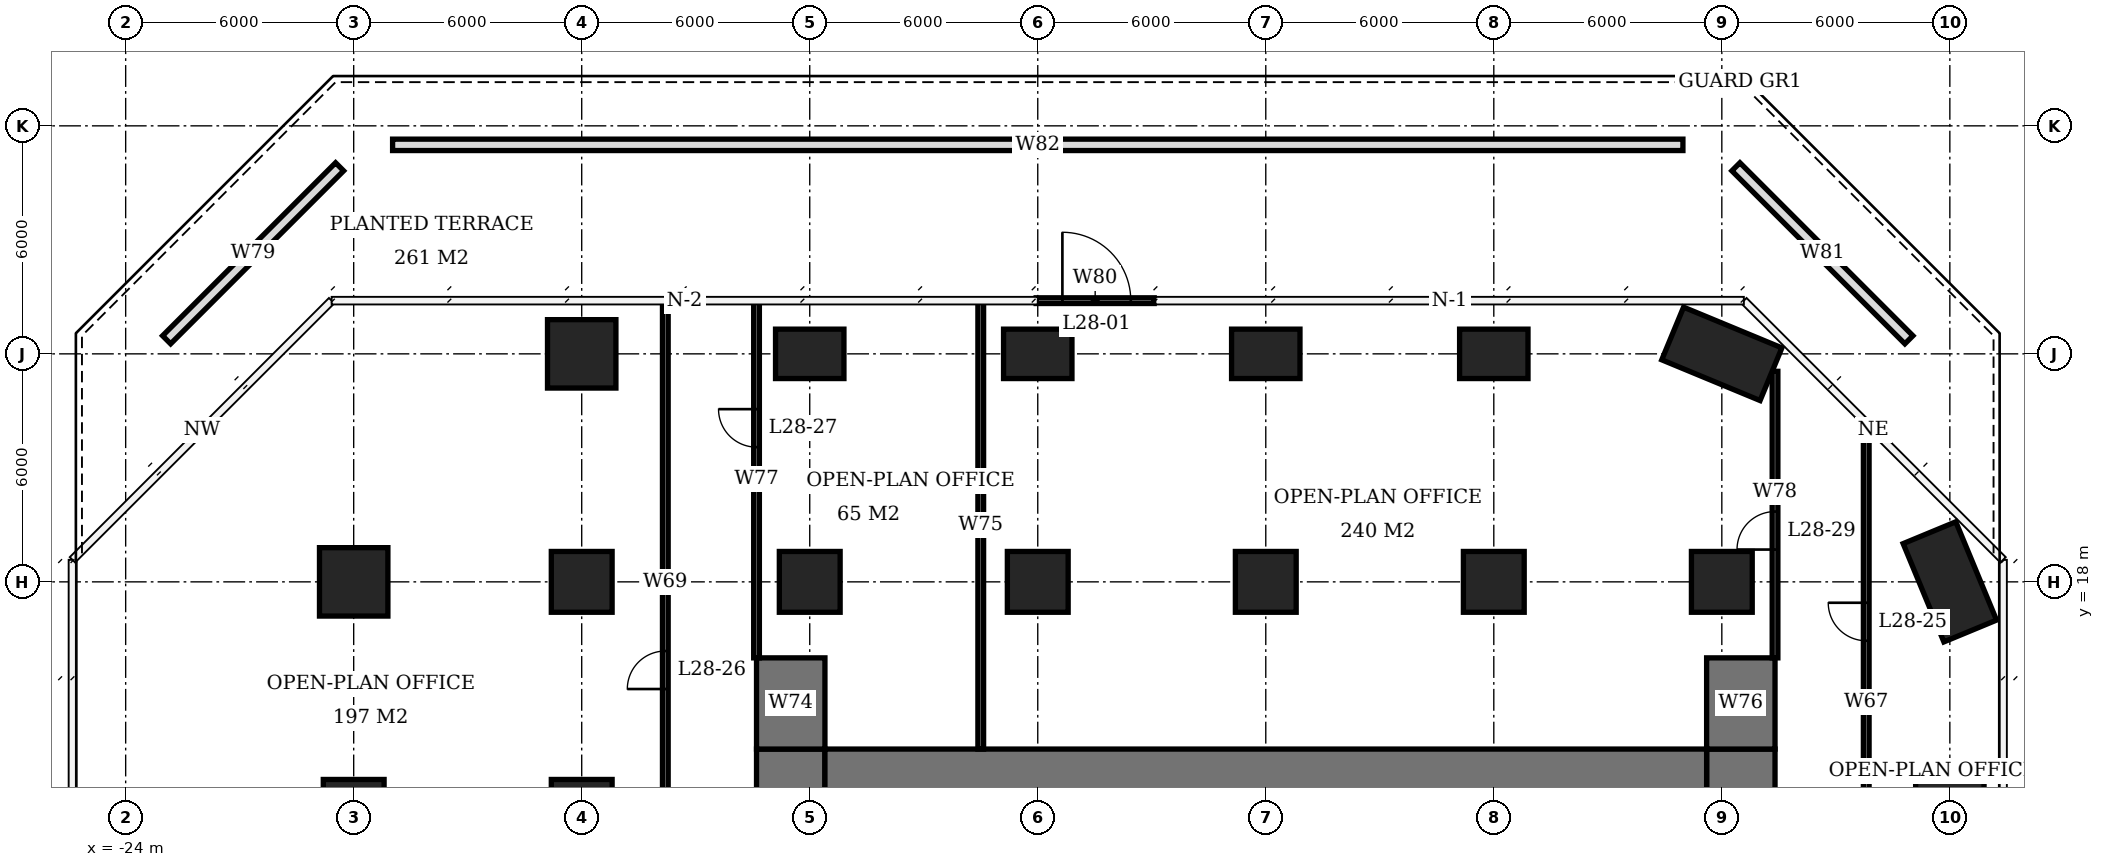
"""IFC4 building model, lengths in metres.
Left out: names, types, materials, properties, quantities, classifications, styles, units other than length and angle.
Written with IfcOpenShell. Run it as: python <this file> out.ifc"""

import sys

from ifc_helpers import new_model, si_unit, direction, frame, frame_2d, origin, origin_2d, place, context, subcontext, project, spatial, rectangle, extrude, element, fill, save


model = new_model("IFC4")
c1 = context("Model", 3, precision=1e-05, world=origin(), true_north=direction((0.0, 1.0)))
c2 = subcontext(c1, "Body", "Model", "MODEL_VIEW")
j1 = project(units=[si_unit("LENGTHUNIT", "METRE"), si_unit("PLANEANGLEUNIT", "RADIAN")], contexts=[c1])
p1 = place(None, origin())
s1 = spatial("IfcSite", under=j1, at=p1, CompositionType="ELEMENT")
p2 = place(p1, origin())
s2 = spatial("IfcBuilding", under=s1, at=p2, CompositionType="ELEMENT")
p3 = place(p2, frame((0.0, 0.0, 117.2)))
s3 = spatial("IfcBuildingStorey", under=s2, at=p3, CompositionType="ELEMENT", Elevation=117.2)
p4 = place(p3, frame((-18.0, 12.0, 0.0), z_axis=(0.0, 0.0, 1.0), x_axis=(1.0, 0.0, 0.0)))
e1 = element("IfcColumn", 1, at=p4, inside=s3, PredefinedType="COLUMN", context=c2, shape_type="SweptSolid", body=[
    extrude(rectangle(XDim=1.6, YDim=1.6, at=origin_2d()), origin(), (0.0, 0.0, 1.0), 3.9),
])
p5 = place(p3, frame((-18.0, 18.0, 0.0), z_axis=(0.0, 0.0, 1.0), x_axis=(1.0, 0.0, 0.0)))
e2 = element("IfcColumn", 2, at=p5, inside=s3, PredefinedType="COLUMN", context=c2, shape_type="SweptSolid", body=[
    extrude(rectangle(XDim=1.8, YDim=1.8, at=origin_2d()), origin(), (0.0, 0.0, 1.0), 3.9),
])
for number, where, z_axis, x_axis in (
    (3, (-12.0, 12.0, 0.0), (0.0, 0.0, 1.0), (1.0, 0.0, 0.0)),
    (4, (-12.0, 18.0, 0.0), (0.0, 0.0, 1.0), (1.0, 0.0, 0.0)),
):
    element("IfcColumn", number, at=place(p3, frame(where, z_axis=z_axis, x_axis=x_axis)), inside=s3, PredefinedType="COLUMN", context=c2, shape_type="SweptSolid", body=[
        extrude(rectangle(XDim=1.6, YDim=1.6, at=origin_2d()), origin(), (0.0, 0.0, 1.0), 3.9),
    ])
p6 = place(p3, frame((-12.0, 24.0, 0.0), z_axis=(0.0, 0.0, 1.0), x_axis=(1.0, 0.0, 0.0)))
e5 = element("IfcColumn", 5, at=p6, inside=s3, PredefinedType="COLUMN", context=c2, shape_type="SweptSolid", body=[
    extrude(rectangle(XDim=1.8, YDim=1.8, at=origin_2d()), origin(), (0.0, 0.0, 1.0), 3.9),
])
p7 = place(p3, frame((-6.0, 18.0, 0.0), z_axis=(0.0, 0.0, 1.0), x_axis=(1.0, 0.0, 0.0)))
e6 = element("IfcColumn", 6, at=p7, inside=s3, PredefinedType="COLUMN", context=c2, shape_type="SweptSolid", body=[
    extrude(rectangle(XDim=1.6, YDim=1.6, at=origin_2d()), origin(), (0.0, 0.0, 1.0), 3.9),
])
p8 = place(p3, frame((-6.0, 24.0, 0.0), z_axis=(0.0, 0.0, 1.0), x_axis=(1.0, 0.0, 0.0)))
e7 = element("IfcColumn", 7, at=p8, inside=s3, PredefinedType="COLUMN", context=c2, shape_type="SweptSolid", body=[
    extrude(rectangle(XDim=1.8, YDim=1.3, at=origin_2d()), origin(), (0.0, 0.0, 1.0), 3.9),
])
p9 = place(p3, frame((0.0, 18.0, 0.0), z_axis=(0.0, 0.0, 1.0), x_axis=(1.0, 0.0, 0.0)))
e8 = element("IfcColumn", 8, at=p9, inside=s3, PredefinedType="COLUMN", context=c2, shape_type="SweptSolid", body=[
    extrude(rectangle(XDim=1.6, YDim=1.6, at=origin_2d()), origin(), (0.0, 0.0, 1.0), 3.9),
])
p10 = place(p3, frame((0.0, 24.0, 0.0), z_axis=(0.0, 0.0, 1.0), x_axis=(1.0, 0.0, 0.0)))
e9 = element("IfcColumn", 9, at=p10, inside=s3, PredefinedType="COLUMN", context=c2, shape_type="SweptSolid", body=[
    extrude(rectangle(XDim=1.8, YDim=1.3, at=origin_2d()), origin(), (0.0, 0.0, 1.0), 3.9),
])
p11 = place(p3, frame((6.0, 18.0, 0.0), z_axis=(0.0, 0.0, 1.0), x_axis=(1.0, 0.0, 0.0)))
e10 = element("IfcColumn", 10, at=p11, inside=s3, PredefinedType="COLUMN", context=c2, shape_type="SweptSolid", body=[
    extrude(rectangle(XDim=1.6, YDim=1.6, at=origin_2d()), origin(), (0.0, 0.0, 1.0), 3.9),
])
p12 = place(p3, frame((6.0, 24.0, 0.0), z_axis=(0.0, 0.0, 1.0), x_axis=(1.0, 0.0, 0.0)))
e11 = element("IfcColumn", 11, at=p12, inside=s3, PredefinedType="COLUMN", context=c2, shape_type="SweptSolid", body=[
    extrude(rectangle(XDim=1.8, YDim=1.3, at=origin_2d()), origin(), (0.0, 0.0, 1.0), 3.9),
])
p13 = place(p3, frame((12.0, 18.0, 0.0), z_axis=(0.0, 0.0, 1.0), x_axis=(1.0, 0.0, 0.0)))
e12 = element("IfcColumn", 12, at=p13, inside=s3, PredefinedType="COLUMN", context=c2, shape_type="SweptSolid", body=[
    extrude(rectangle(XDim=1.6, YDim=1.6, at=origin_2d()), origin(), (0.0, 0.0, 1.0), 3.9),
])
p14 = place(p3, frame((12.0, 24.0, 0.0), z_axis=(0.0, 0.0, 1.0), x_axis=(1.0, 0.0, 0.0)))
e13 = element("IfcColumn", 13, at=p14, inside=s3, PredefinedType="COLUMN", context=c2, shape_type="SweptSolid", body=[
    extrude(rectangle(XDim=1.8, YDim=1.3, at=origin_2d()), origin(), (0.0, 0.0, 1.0), 3.9),
])
p15 = place(p3, frame((18.0, 18.0, 0.0), z_axis=(0.0, 0.0, 1.0), x_axis=(1.0, 0.0, 0.0)))
e14 = element("IfcColumn", 14, at=p15, inside=s3, PredefinedType="COLUMN", context=c2, shape_type="SweptSolid", body=[
    extrude(rectangle(XDim=1.6, YDim=1.6, at=origin_2d()), origin(), (0.0, 0.0, 1.0), 3.9),
])
p16 = place(p3, frame((18.0, 24.0, 0.0), z_axis=(0.0, 0.0, 1.0), x_axis=(0.923879532511, -0.382683432365, 0.0)))
e15 = element("IfcColumn", 15, at=p16, inside=s3, PredefinedType="COLUMN", context=c2, shape_type="SweptSolid", body=[
    extrude(rectangle(XDim=2.8, YDim=1.5, at=origin_2d()), origin(), (0.0, 0.0, 1.0), 3.9),
])
p17 = place(p3, frame((24.0, 12.0, 0.0), z_axis=(0.0, 0.0, 1.0), x_axis=(1.0, 0.0, 0.0)))
e16 = element("IfcColumn", 16, at=p17, inside=s3, PredefinedType="COLUMN", context=c2, shape_type="SweptSolid", body=[
    extrude(rectangle(XDim=1.8, YDim=1.8, at=origin_2d()), origin(), (0.0, 0.0, 1.0), 3.9),
])
p18 = place(p3, frame((24.0, 18.0, 0.0), z_axis=(0.0, 0.0, 1.0), x_axis=(0.382683432365, -0.923879532511, 0.0)))
e17 = element("IfcColumn", 17, at=p18, inside=s3, PredefinedType="COLUMN", context=c2, shape_type="SweptSolid", body=[
    extrude(rectangle(XDim=2.8, YDim=1.5, at=origin_2d()), origin(), (0.0, 0.0, 1.0), 3.9),
])
p19 = place(p3, frame((-5.6, 12.6, 0.0), z_axis=(0.0, 0.0, 1.0), x_axis=(1.0, 0.0, 0.0)))
e18 = element("IfcWall", 18, at=p19, inside=s3, PredefinedType="SHEAR", context=c2, shape_type="SweptSolid", body=[
    extrude(rectangle(XDim=23.2, YDim=2.0, at=frame_2d((11.6, 0.0))), origin(), (0.0, 0.0, 1.0), 3.9),
])
p20 = place(p3, frame((-6.5, -7.6, 0.0), z_axis=(0.0, 0.0, 1.0), x_axis=(0.0, 1.0, 0.0)))
e19 = element("IfcWall", 19, at=p20, inside=s3, PredefinedType="SHEAR", context=c2, shape_type="SweptSolid", body=[
    extrude(rectangle(XDim=21.2, YDim=1.8, at=frame_2d((10.6, 0.0))), origin(), (0.0, 0.0, 1.0), 3.9),
])
p21 = place(p20, frame((7.8, 0.0, 0.0)))
e20 = element("IfcOpeningElement", 20, at=p21, cuts=e19, PredefinedType="OPENING", context=c2, shape_type="SweptSolid", body=[
    extrude(rectangle(XDim=1.8, YDim=2.4, at=frame_2d((0.9, 1.2))), frame((0.0, 0.91, 0.0), z_axis=(0.0, -1.0, 0.0), x_axis=(1.0, 0.0, 0.0)), (0.0, 0.0, 1.0), 1.82),
])
p22 = place(p3, frame((18.5, -7.6, 0.0), z_axis=(0.0, 0.0, 1.0), x_axis=(0.0, 1.0, 0.0)))
e21 = element("IfcWall", 21, at=p22, inside=s3, PredefinedType="SHEAR", context=c2, shape_type="SweptSolid", body=[
    extrude(rectangle(XDim=21.2, YDim=1.8, at=frame_2d((10.6, 0.0))), origin(), (0.0, 0.0, 1.0), 3.9),
])
p23 = place(p22, frame((9.2, 0.0, 0.0)))
e22 = element("IfcOpeningElement", 22, at=p23, cuts=e21, PredefinedType="OPENING", context=c2, shape_type="SweptSolid", body=[
    extrude(rectangle(XDim=1.8, YDim=2.4, at=frame_2d((0.9, 1.2))), frame((0.0, 0.91, 0.0), z_axis=(0.0, -1.0, 0.0), x_axis=(1.0, 0.0, 0.0)), (0.0, 0.0, 1.0), 1.82),
])
for number, where, z_axis, x_axis in (
    (23, (-6.5, 13.6, 0.0), (0.0, 0.0, 1.0), (0.0, 1.0, 0.0)),
    (24, (18.5, 13.6, 0.0), (0.0, 0.0, 1.0), (0.0, 1.0, 0.0)),
):
    element("IfcWall", number, at=place(p3, frame(where, z_axis=z_axis, x_axis=x_axis)), inside=s3, PredefinedType="SHEAR", context=c2, shape_type="SweptSolid", body=[
        extrude(rectangle(XDim=2.4, YDim=1.8, at=frame_2d((1.2, 0.0))), origin(), (0.0, 0.0, 1.0), 3.9),
    ])
p24 = place(p3, frame((-0.042, 25.4, 0.0), z_axis=(0.0, 0.0, 1.0), x_axis=(1.0, 0.0, 0.0)))
e25 = element("IfcWall", 25, at=p24, inside=s3, PredefinedType="USERDEFINED", context=c2, shape_type="SweptSolid", body=[
    extrude(rectangle(XDim=3.107, YDim=0.15, at=frame_2d((1.553, 0.0))), origin(), (0.0, 0.0, 1.0), 3.9),
])
p25 = place(p24, frame((0.691, 0.0, 0.0)))
e26 = element("IfcOpeningElement", 26, at=p25, cuts=e25, PredefinedType="OPENING", context=c2, shape_type="SweptSolid", body=[
    extrude(rectangle(XDim=1.8, YDim=2.4, at=frame_2d((0.9, 1.2))), frame((0.0, 0.085, 0.0), z_axis=(0.0, -1.0, 0.0), x_axis=(1.0, 0.0, 0.0)), (0.0, 0.0, 1.0), 0.17),
])
p26 = place(p3, frame((-22.923, 24.37, 0.0), z_axis=(0.0, 0.0, 1.0), x_axis=(0.707106781187, 0.707106781187, 0.0)))
e27 = element("IfcWall", 27, at=p26, inside=s3, PredefinedType="USERDEFINED", context=c2, shape_type="SweptSolid", body=[
    extrude(rectangle(XDim=6.438, YDim=0.3, at=frame_2d((3.219, 0.0))), origin(), (0.0, 0.0, 1.0), 0.6),
])
p27 = place(p3, frame((-16.976, 29.5, 0.0), z_axis=(0.0, 0.0, 1.0), x_axis=(1.0, 0.0, 0.0)))
e28 = element("IfcWall", 28, at=p27, inside=s3, PredefinedType="USERDEFINED", context=c2, shape_type="SweptSolid", body=[
    extrude(rectangle(XDim=33.953, YDim=0.3, at=frame_2d((16.976, 0.0))), origin(), (0.0, 0.0, 1.0), 0.6),
])
p28 = place(p3, frame((18.37, 28.923, 0.0), z_axis=(0.0, 0.0, 1.0), x_axis=(0.707106781187, -0.707106781187, 0.0)))
e29 = element("IfcWall", 29, at=p28, inside=s3, PredefinedType="USERDEFINED", context=c2, shape_type="SweptSolid", body=[
    extrude(rectangle(XDim=6.438, YDim=0.3, at=frame_2d((3.219, 0.0))), origin(), (0.0, 0.0, 1.0), 0.6),
])
p29 = place(p3, frame((-9.8, 10.575, 0.0), z_axis=(0.0, 0.0, 1.0), x_axis=(0.0, 1.0, 0.0)))
e30 = element("IfcWall", 30, at=p29, inside=s3, PredefinedType="PARTITIONING", context=c2, shape_type="SweptSolid", body=[
    extrude(rectangle(XDim=14.825, YDim=0.15, at=frame_2d((7.413, 0.0))), origin(), (0.0, 0.0, 1.0), 3.65),
])
p30 = place(p29, frame((4.605, 0.0, 0.0)))
e31 = element("IfcOpeningElement", 31, at=p30, cuts=e30, PredefinedType="OPENING", context=c2, shape_type="SweptSolid", body=[
    extrude(rectangle(XDim=1.0, YDim=2.1, at=frame_2d((0.5, 1.05))), frame((0.0, 0.085, 0.0), z_axis=(0.0, -1.0, 0.0), x_axis=(1.0, 0.0, 0.0)), (0.0, 0.0, 1.0), 0.17),
])
p31 = place(p3, frame((-7.4, 16.0, 0.0), z_axis=(0.0, 0.0, 1.0), x_axis=(0.0, 1.0, 0.0)))
e32 = element("IfcWall", 32, at=p31, inside=s3, PredefinedType="PARTITIONING", context=c2, shape_type="SweptSolid", body=[
    extrude(rectangle(XDim=9.4, YDim=0.15, at=frame_2d((4.7, 0.0))), origin(), (0.0, 0.0, 1.0), 3.65),
])
p32 = place(p31, frame((5.545, 0.0, 0.0)))
e33 = element("IfcOpeningElement", 33, at=p32, cuts=e32, PredefinedType="OPENING", context=c2, shape_type="SweptSolid", body=[
    extrude(rectangle(XDim=1.0, YDim=2.1, at=frame_2d((0.5, 1.05))), frame((0.0, 0.085, 0.0), z_axis=(0.0, -1.0, 0.0), x_axis=(1.0, 0.0, 0.0)), (0.0, 0.0, 1.0), 0.17),
])
p33 = place(p3, frame((-1.5, 13.6, 0.0), z_axis=(0.0, 0.0, 1.0), x_axis=(0.0, 1.0, 0.0)))
e34 = element("IfcWall", 34, at=p33, inside=s3, PredefinedType="PARTITIONING", context=c2, shape_type="SweptSolid", body=[
    extrude(rectangle(XDim=11.8, YDim=0.15, at=frame_2d((5.9, 0.0))), origin(), (0.0, 0.0, 1.0), 3.65),
])
p34 = place(p3, frame((19.4, 16.0, 0.0), z_axis=(0.0, 0.0, 1.0), x_axis=(0.0, 1.0, 0.0)))
e35 = element("IfcWall", 35, at=p34, inside=s3, PredefinedType="PARTITIONING", context=c2, shape_type="SweptSolid", body=[
    extrude(rectangle(XDim=7.541, YDim=0.15, at=frame_2d((3.77, 0.0))), origin(), (0.0, 0.0, 1.0), 3.65),
])
p35 = place(p34, frame((2.85, 0.0, 0.0)))
e36 = element("IfcOpeningElement", 36, at=p35, cuts=e35, PredefinedType="OPENING", context=c2, shape_type="SweptSolid", body=[
    extrude(rectangle(XDim=1.0, YDim=2.1, at=frame_2d((0.5, 1.05))), frame((0.0, 0.085, 0.0), z_axis=(0.0, -1.0, 0.0), x_axis=(1.0, 0.0, 0.0)), (0.0, 0.0, 1.0), 0.17),
])
p36 = place(p3, frame((21.8, 7.575, 0.0), z_axis=(0.0, 0.0, 1.0), x_axis=(0.0, 1.0, 0.0)))
e37 = element("IfcWall", 37, at=p36, inside=s3, PredefinedType="PARTITIONING", context=c2, shape_type="SweptSolid", body=[
    extrude(rectangle(XDim=14.514, YDim=0.15, at=frame_2d((7.257, 0.0))), origin(), (0.0, 0.0, 1.0), 3.65),
])
p37 = place(p36, frame((8.875, 0.0, 0.0)))
e38 = element("IfcOpeningElement", 38, at=p37, cuts=e37, PredefinedType="OPENING", context=c2, shape_type="SweptSolid", body=[
    extrude(rectangle(XDim=1.0, YDim=2.1, at=frame_2d((0.5, 1.05))), frame((0.0, 0.085, 0.0), z_axis=(0.0, -1.0, 0.0), x_axis=(1.0, 0.0, 0.0)), (0.0, 0.0, 1.0), 0.17),
])
p38 = place(p25, origin())
e39 = element("IfcDoor", 39, at=p38, inside=s3, OperationType="DOUBLE_DOOR_SINGLE_SWING", PredefinedType="DOOR", context=c2, shape_type="SweptSolid", body=[
    extrude(rectangle(XDim=1.8, YDim=2.4, at=frame_2d((0.9, 1.2))), frame((0.0, 0.025, 0.0), z_axis=(0.0, -1.0, 0.0), x_axis=(1.0, 0.0, 0.0)), (0.0, 0.0, 1.0), 0.05),
])
fill(e26, e39)
p39 = place(p37, origin())
e40 = element("IfcDoor", 40, at=p39, inside=s3, OperationType="SINGLE_SWING_RIGHT", PredefinedType="DOOR", context=c2, shape_type="SweptSolid", body=[
    extrude(rectangle(XDim=1.0, YDim=2.1, at=frame_2d((0.5, 1.05))), frame((0.0, 0.025, 0.0), z_axis=(0.0, -1.0, 0.0), x_axis=(1.0, 0.0, 0.0)), (0.0, 0.0, 1.0), 0.05),
])
fill(e38, e40)
p40 = place(p30, origin())
e41 = element("IfcDoor", 41, at=p40, inside=s3, OperationType="SINGLE_SWING_LEFT", PredefinedType="DOOR", context=c2, shape_type="SweptSolid", body=[
    extrude(rectangle(XDim=1.0, YDim=2.1, at=frame_2d((0.5, 1.05))), frame((0.0, 0.025, 0.0), z_axis=(0.0, -1.0, 0.0), x_axis=(1.0, 0.0, 0.0)), (0.0, 0.0, 1.0), 0.05),
])
fill(e31, e41)
p41 = place(p32, origin())
e42 = element("IfcDoor", 42, at=p41, inside=s3, OperationType="SINGLE_SWING_RIGHT", PredefinedType="DOOR", context=c2, shape_type="SweptSolid", body=[
    extrude(rectangle(XDim=1.0, YDim=2.1, at=frame_2d((0.5, 1.05))), frame((0.0, 0.025, 0.0), z_axis=(0.0, -1.0, 0.0), x_axis=(1.0, 0.0, 0.0)), (0.0, 0.0, 1.0), 0.05),
])
fill(e33, e42)
p42 = place(p35, origin())
e43 = element("IfcDoor", 43, at=p42, inside=s3, OperationType="SINGLE_SWING_LEFT", PredefinedType="DOOR", context=c2, shape_type="SweptSolid", body=[
    extrude(rectangle(XDim=1.0, YDim=2.1, at=frame_2d((0.5, 1.05))), frame((0.0, 0.025, 0.0), z_axis=(0.0, -1.0, 0.0), x_axis=(1.0, 0.0, 0.0)), (0.0, 0.0, 1.0), 0.05),
])
fill(e36, e43)
save(model, sys.argv[1])
